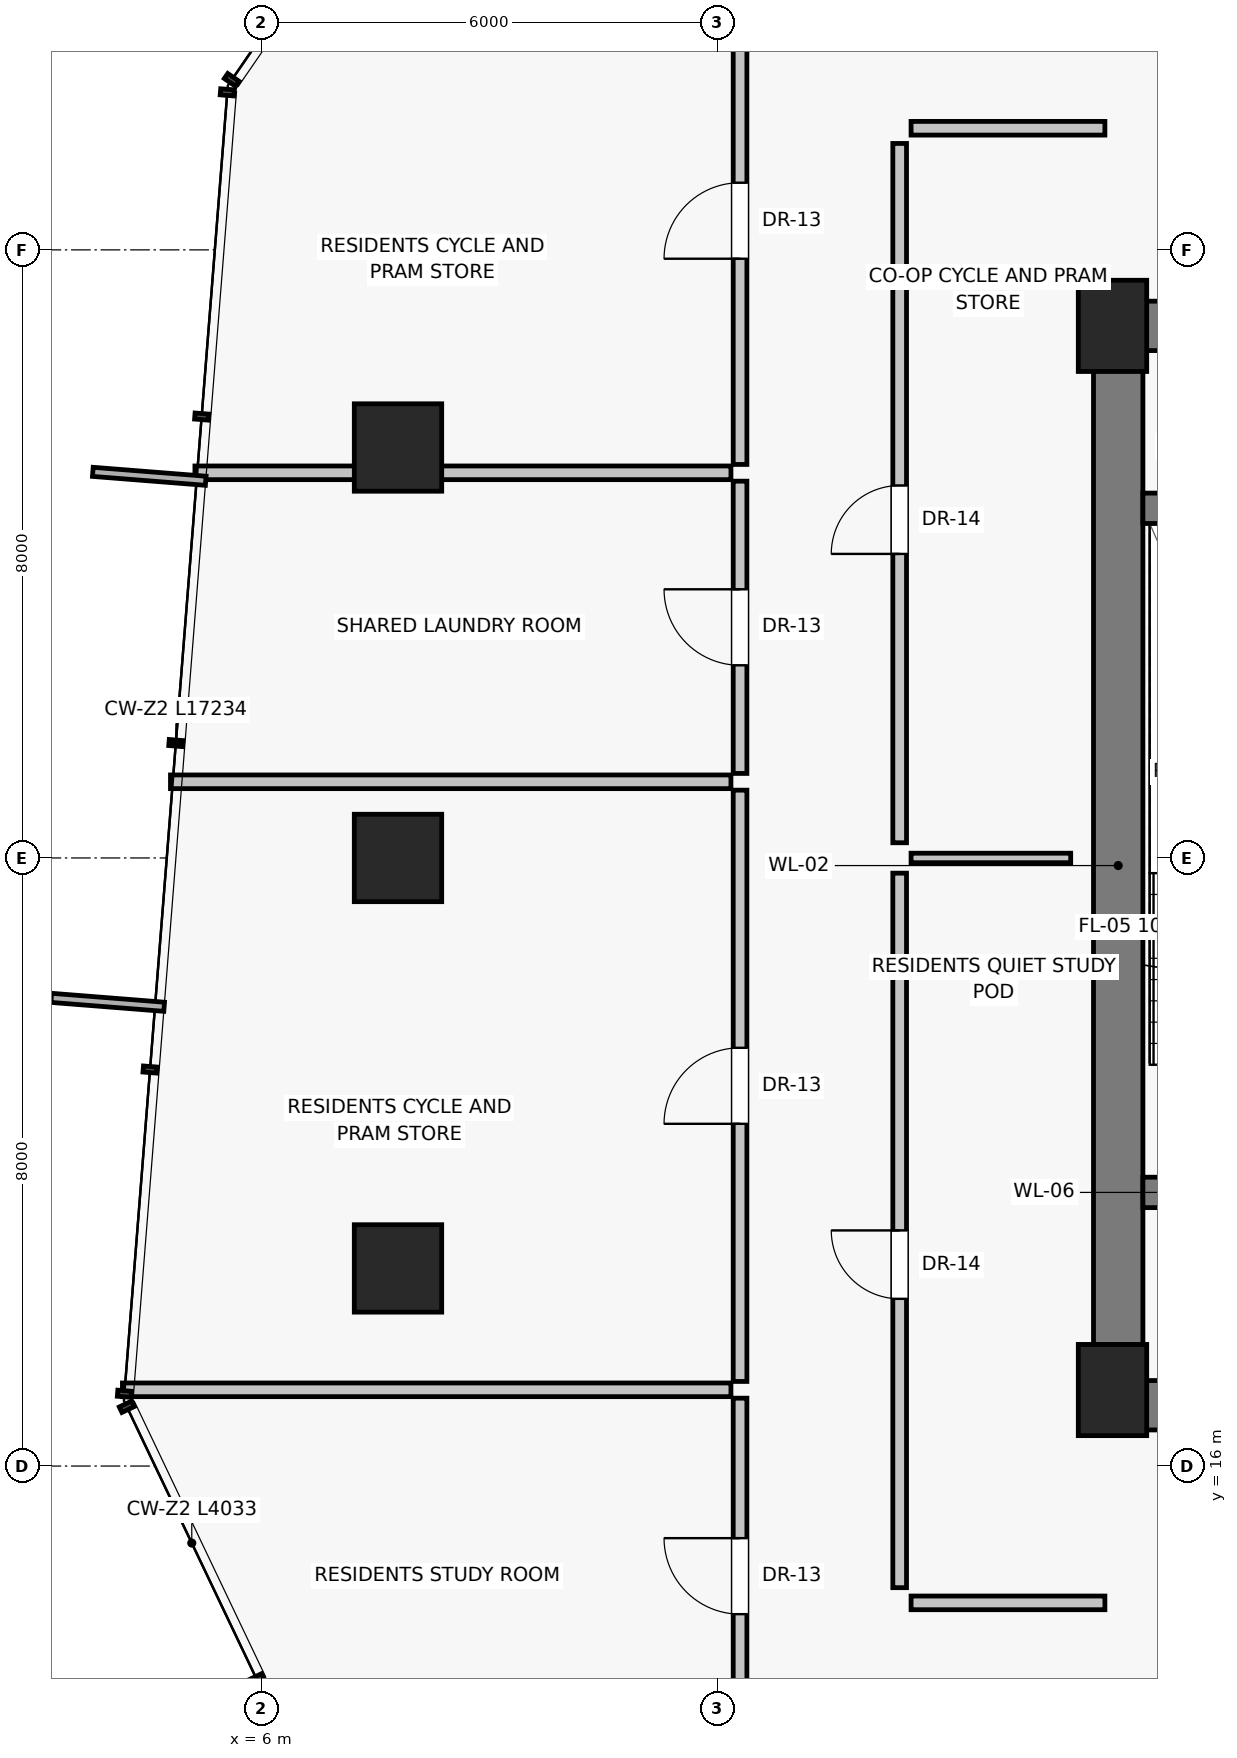
"""IFC4 building model, lengths in metres.
Left out: names, types, materials, properties, quantities, classifications, styles, units other than length and angle.
Written with IfcOpenShell. Run it as: python <this file> out.ifc"""

import sys

from ifc_helpers import new_model, si_unit, direction, frame, frame_2d, origin, origin_2d, place, context, subcontext, project, spatial, rectangle, extrude, source, transform, mapped, element, fill, save


model = new_model("IFC4")
c1 = context("Model", 3, precision=1e-05, world=origin(), true_north=direction((0.0, 1.0)))
c2 = subcontext(c1, "Body", "Model", "MODEL_VIEW")
j1 = project(units=[si_unit("LENGTHUNIT", "METRE"), si_unit("PLANEANGLEUNIT", "RADIAN")], contexts=[c1])
p1 = place(None, origin())
s1 = spatial("IfcSite", under=j1, at=p1, CompositionType="ELEMENT")
p2 = place(p1, origin())
s2 = spatial("IfcBuilding", under=s1, at=p2, CompositionType="ELEMENT")
p3 = place(p2, frame((0.0, 0.0, 113.25)))
s3 = spatial("IfcBuildingStorey", under=s2, at=p3, CompositionType="ELEMENT", Elevation=113.25)
for number, where, z_axis, x_axis in (
    (1, (17.2, 17.0, 0.0), (0.0, 0.0, 1.0), (1.0, 0.0, 0.0)),
    (2, (17.2, 31.0, 0.0), (0.0, 0.0, 1.0), (1.0, 0.0, 0.0)),
):
    element("IfcColumn", number, at=place(p3, frame(where, z_axis=z_axis, x_axis=x_axis)), inside=s3, PredefinedType="PILASTER", context=c2, shape_type="SweptSolid", body=[
        extrude(rectangle(XDim=0.9, YDim=1.2, at=origin_2d()), origin(), (0.0, 0.0, 1.0), 3.25),
    ])
for number, where, z_axis, x_axis in (
    (3, (7.8, 29.4, 0.0), (0.0, 0.0, 1.0), (1.0, 0.0, 0.0)),
    (4, (7.8, 24.0, 0.0), (0.0, 0.0, 1.0), (1.0, 0.0, 0.0)),
    (5, (7.8, 18.6, 0.0), (0.0, 0.0, 1.0), (1.0, 0.0, 0.0)),
):
    element("IfcColumn", number, at=place(p3, frame(where, z_axis=z_axis, x_axis=x_axis)), inside=s3, PredefinedType="COLUMN", context=c2, shape_type="SweptSolid", body=[
        extrude(rectangle(XDim=1.15, YDim=1.15, at=origin_2d()), origin(), (0.0, 0.0, 1.0), 3.25),
    ])
p4 = place(p3, frame((17.275, 16.8, 0.0), z_axis=(0.0, 0.0, 1.0), x_axis=(0.0, 1.0, 0.0)))
e6 = element("IfcWall", 6, at=p4, inside=s3, PredefinedType="SHEAR", context=c2, shape_type="SweptSolid", body=[
    extrude(rectangle(XDim=14.2, YDim=0.65, at=frame_2d((7.1, 0.0))), origin(), (0.0, 0.0, 1.0), 3.0),
])
p5 = place(p3, frame((17.2, 16.8, 0.0), z_axis=(0.0, 0.0, 1.0), x_axis=(1.0, 0.0, 0.0)))
e7 = element("IfcWall", 7, at=p5, inside=s3, PredefinedType="SHEAR", context=c2, shape_type="SweptSolid", body=[
    extrude(rectangle(XDim=5.85, YDim=0.65, at=frame_2d((2.925, 0.0))), origin(), (0.0, 0.0, 1.0), 3.0),
])
p6 = place(p5, frame((1.15, 0.0, 0.0)))
e8 = element("IfcOpeningElement", 8, at=p6, cuts=e7, PredefinedType="OPENING", context=c2, shape_type="SweptSolid", body=[
    extrude(rectangle(XDim=1.2, YDim=2.03, at=frame_2d((0.6, 1.015))), frame((0.0, 0.335, 0.0), z_axis=(0.0, -1.0, 0.0), x_axis=(1.0, 0.0, 0.0)), (0.0, 0.0, 1.0), 0.67),
])
p7 = place(p3, frame((17.2, 31.0, 0.0), z_axis=(0.0, 0.0, 1.0), x_axis=(1.0, 0.0, 0.0)))
e9 = element("IfcWall", 9, at=p7, inside=s3, PredefinedType="SHEAR", context=c2, shape_type="SweptSolid", body=[
    extrude(rectangle(XDim=3.8, YDim=0.65, at=frame_2d((1.9, 0.0))), origin(), (0.0, 0.0, 1.0), 3.0),
])
p8 = place(p7, frame((1.25, 0.0, 0.0)))
e10 = element("IfcOpeningElement", 10, at=p8, cuts=e9, PredefinedType="OPENING", context=c2, shape_type="SweptSolid", body=[
    extrude(rectangle(XDim=0.86, YDim=2.01, at=frame_2d((0.43, 1.005))), frame((0.0, 0.335, 0.0), z_axis=(0.0, -1.0, 0.0), x_axis=(1.0, 0.0, 0.0)), (0.0, 0.0, 1.0), 0.67),
])
p9 = place(p3, frame((17.6, 19.6, 0.0), z_axis=(0.0, 0.0, 1.0), x_axis=(1.0, 0.0, 0.0)))
e11 = element("IfcWall", 11, at=p9, inside=s3, PredefinedType="SHEAR", context=c2, shape_type="SweptSolid", body=[
    extrude(rectangle(XDim=3.4, YDim=0.4, at=frame_2d((1.7, 0.0))), origin(), (0.0, 0.0, 1.0), 3.0),
])
p10 = place(p9, frame((1.05, 0.0, 0.0)))
e12 = element("IfcOpeningElement", 12, at=p10, cuts=e11, PredefinedType="OPENING", context=c2, shape_type="SweptSolid", body=[
    extrude(rectangle(XDim=1.1, YDim=2.03, at=frame_2d((0.55, 1.015))), frame((0.0, 0.21, 0.0), z_axis=(0.0, -1.0, 0.0), x_axis=(1.0, 0.0, 0.0)), (0.0, 0.0, 1.0), 0.42),
])
p11 = place(p3, frame((17.6, 28.6, 0.0), z_axis=(0.0, 0.0, 1.0), x_axis=(1.0, 0.0, 0.0)))
e13 = element("IfcWall", 13, at=p11, inside=s3, PredefinedType="SHEAR", context=c2, shape_type="SweptSolid", body=[
    extrude(rectangle(XDim=3.4, YDim=0.4, at=frame_2d((1.7, 0.0))), origin(), (0.0, 0.0, 1.0), 3.0),
])
p12 = place(p3, frame((14.4, 14.4, 0.0), z_axis=(0.0, 0.0, 1.0), x_axis=(0.0, 1.0, 0.0)))
e14 = element("IfcWall", 14, at=p12, inside=s3, PredefinedType="PARTITIONING", context=c2, shape_type="SweptSolid", body=[
    extrude(rectangle(XDim=9.4, YDim=0.18, at=frame_2d((4.7, 0.0))), origin(), (0.0, 0.0, 1.0), 3.0),
])
p13 = place(p12, frame((3.8, 0.0, 0.0)))
e15 = element("IfcOpeningElement", 15, at=p13, cuts=e14, PredefinedType="OPENING", context=c2, shape_type="SweptSolid", body=[
    extrude(rectangle(XDim=0.9, YDim=2.01, at=frame_2d((0.45, 1.005))), frame((0.0, 0.1, 0.0), z_axis=(0.0, -1.0, 0.0), x_axis=(1.0, 0.0, 0.0)), (0.0, 0.0, 1.0), 0.2),
])
p14 = place(p3, frame((14.4, 24.2, 0.0), z_axis=(0.0, 0.0, 1.0), x_axis=(0.0, 1.0, 0.0)))
e16 = element("IfcWall", 16, at=p14, inside=s3, PredefinedType="PARTITIONING", context=c2, shape_type="SweptSolid", body=[
    extrude(rectangle(XDim=9.2, YDim=0.18, at=frame_2d((4.6, 0.0))), origin(), (0.0, 0.0, 1.0), 3.0),
])
p15 = place(p14, frame((3.8, 0.0, 0.0)))
e17 = element("IfcOpeningElement", 17, at=p15, cuts=e16, PredefinedType="OPENING", context=c2, shape_type="SweptSolid", body=[
    extrude(rectangle(XDim=0.9, YDim=2.01, at=frame_2d((0.45, 1.005))), frame((0.0, 0.1, 0.0), z_axis=(0.0, -1.0, 0.0), x_axis=(1.0, 0.0, 0.0)), (0.0, 0.0, 1.0), 0.2),
])
p16 = place(p3, frame((14.55, 24.0, 0.0), z_axis=(0.0, 0.0, 1.0), x_axis=(1.0, 0.0, 0.0)))
e18 = element("IfcWall", 18, at=p16, inside=s3, PredefinedType="PARTITIONING", context=c2, shape_type="SweptSolid", body=[
    extrude(rectangle(XDim=2.1, YDim=0.125, at=frame_2d((1.05, 0.0))), origin(), (0.0, 0.0, 1.0), 3.0),
])
for number, where, z_axis, x_axis in (
    (19, (14.55, 14.2, 0.0), (0.0, 0.0, 1.0), (1.0, 0.0, 0.0)),
    (20, (14.55, 33.6, 0.0), (0.0, 0.0, 1.0), (1.0, 0.0, 0.0)),
):
    element("IfcWall", number, at=place(p3, frame(where, z_axis=z_axis, x_axis=x_axis)), inside=s3, PredefinedType="PARTITIONING", context=c2, shape_type="SweptSolid", body=[
        extrude(rectangle(XDim=2.55, YDim=0.18, at=frame_2d((1.275, 0.0))), origin(), (0.0, 0.0, 1.0), 3.0),
    ])
p17 = place(p3, frame((12.3, 12.21, 0.0), z_axis=(0.0, 0.0, 1.0), x_axis=(0.0, 1.0, 0.0)))
e21 = element("IfcWall", 21, at=p17, inside=s3, PredefinedType="PARTITIONING", context=c2, shape_type="SweptSolid", body=[
    extrude(rectangle(XDim=4.683, YDim=0.18, at=frame_2d((2.342, 0.0))), origin(), (0.0, 0.0, 1.0), 3.0),
])
p18 = place(p17, frame((1.842, 0.0, 0.0)))
e22 = element("IfcOpeningElement", 22, at=p18, cuts=e21, PredefinedType="OPENING", context=c2, shape_type="SweptSolid", body=[
    extrude(rectangle(XDim=1.0, YDim=2.01, at=frame_2d((0.5, 1.005))), frame((0.0, 0.1, 0.0), z_axis=(0.0, -1.0, 0.0), x_axis=(1.0, 0.0, 0.0)), (0.0, 0.0, 1.0), 0.2),
])
p19 = place(p3, frame((12.3, 17.113, 0.0), z_axis=(0.0, 0.0, 1.0), x_axis=(0.0, 1.0, 0.0)))
e23 = element("IfcWall", 23, at=p19, inside=s3, PredefinedType="PARTITIONING", context=c2, shape_type="SweptSolid", body=[
    extrude(rectangle(XDim=7.779, YDim=0.18, at=frame_2d((3.89, 0.0))), origin(), (0.0, 0.0, 1.0), 2.58),
])
p20 = place(p19, frame((3.389, 0.0, 0.0)))
e24 = element("IfcOpeningElement", 24, at=p20, cuts=e23, PredefinedType="OPENING", context=c2, shape_type="SweptSolid", body=[
    extrude(rectangle(XDim=1.0, YDim=2.01, at=frame_2d((0.5, 1.005))), frame((0.0, 0.1, 0.0), z_axis=(0.0, -1.0, 0.0), x_axis=(1.0, 0.0, 0.0)), (0.0, 0.0, 1.0), 0.2),
])
p21 = place(p3, frame((12.18, 17.003, 0.0), z_axis=(0.0, 0.0, 1.0), x_axis=(-1.0, 0.0, 0.0)))
e25 = element("IfcWall", 25, at=p21, inside=s3, PredefinedType="PARTITIONING", context=c2, shape_type="SweptSolid", body=[
    extrude(rectangle(XDim=8.005, YDim=0.18, at=frame_2d((4.003, 0.0))), origin(), (0.0, 0.0, 1.0), 3.0),
])
p22 = place(p3, frame((12.18, 25.002, 0.0), z_axis=(0.0, 0.0, 1.0), x_axis=(-1.0, 0.0, 0.0)))
e26 = element("IfcWall", 26, at=p22, inside=s3, PredefinedType="PARTITIONING", context=c2, shape_type="SweptSolid", body=[
    extrude(rectangle(XDim=7.373, YDim=0.18, at=frame_2d((3.687, 0.0))), origin(), (0.0, 0.0, 1.0), 3.0),
])
p23 = place(p3, frame((12.3, 25.112, 0.0), z_axis=(0.0, 0.0, 1.0), x_axis=(0.0, 1.0, 0.0)))
e27 = element("IfcWall", 27, at=p23, inside=s3, PredefinedType="PARTITIONING", context=c2, shape_type="SweptSolid", body=[
    extrude(rectangle(XDim=3.845, YDim=0.18, at=frame_2d((1.922, 0.0))), origin(), (0.0, 0.0, 1.0), 2.58),
])
p24 = place(p23, frame((1.423, 0.0, 0.0)))
e28 = element("IfcOpeningElement", 28, at=p24, cuts=e27, PredefinedType="OPENING", context=c2, shape_type="SweptSolid", body=[
    extrude(rectangle(XDim=1.0, YDim=2.01, at=frame_2d((0.5, 1.005))), frame((0.0, 0.1, 0.0), z_axis=(0.0, -1.0, 0.0), x_axis=(1.0, 0.0, 0.0)), (0.0, 0.0, 1.0), 0.2),
])
p25 = place(p3, frame((12.3, 29.177, 0.0), z_axis=(0.0, 0.0, 1.0), x_axis=(0.0, 1.0, 0.0)))
e29 = element("IfcWall", 29, at=p25, inside=s3, PredefinedType="PARTITIONING", context=c2, shape_type="SweptSolid", body=[
    extrude(rectangle(XDim=6.413, YDim=0.18, at=frame_2d((3.207, 0.0))), origin(), (0.0, 0.0, 1.0), 2.58),
])
p26 = place(p25, frame((2.707, 0.0, 0.0)))
e30 = element("IfcOpeningElement", 30, at=p26, cuts=e29, PredefinedType="OPENING", context=c2, shape_type="SweptSolid", body=[
    extrude(rectangle(XDim=1.0, YDim=2.01, at=frame_2d((0.5, 1.005))), frame((0.0, 0.1, 0.0), z_axis=(0.0, -1.0, 0.0), x_axis=(1.0, 0.0, 0.0)), (0.0, 0.0, 1.0), 0.2),
])
p27 = place(p3, frame((12.18, 29.067, 0.0), z_axis=(0.0, 0.0, 1.0), x_axis=(-1.0, 0.0, 0.0)))
e31 = element("IfcWall", 31, at=p27, inside=s3, PredefinedType="PARTITIONING", context=c2, shape_type="SweptSolid", body=[
    extrude(rectangle(XDim=7.052, YDim=0.18, at=frame_2d((3.526, 0.0))), origin(), (0.0, 0.0, 1.0), 2.378),
])
m1 = source(origin(), c2, "Body", "SweptSolid", [
    extrude(rectangle(XDim=0.9, YDim=2.01, at=frame_2d((0.45, 1.005))), frame((0.0, 0.025, 0.0), z_axis=(0.0, -1.0, 0.0), x_axis=(1.0, 0.0, 0.0)), (0.0, 0.0, 1.0), 0.05),
])
p28 = place(p13, origin())
e32 = element("IfcDoor", 32, at=p28, inside=s3, OperationType="SINGLE_SWING_RIGHT", PredefinedType="DOOR", context=c2, shape_type="MappedRepresentation", body=[
    mapped(m1, transform((0.0, 0.0, 0.0), scale=1.0)),
])
fill(e15, e32)
p29 = place(p15, origin())
e33 = element("IfcDoor", 33, at=p29, inside=s3, OperationType="SINGLE_SWING_LEFT", PredefinedType="DOOR", context=c2, shape_type="MappedRepresentation", body=[
    mapped(m1, transform((0.0, 0.0, 0.0), scale=1.0)),
])
fill(e17, e33)
m2 = source(origin(), c2, "Body", "SweptSolid", [
    extrude(rectangle(XDim=1.0, YDim=2.01, at=frame_2d((0.5, 1.005))), frame((0.0, 0.025, 0.0), z_axis=(0.0, -1.0, 0.0), x_axis=(1.0, 0.0, 0.0)), (0.0, 0.0, 1.0), 0.05),
])
p30 = place(p18, origin())
e34 = element("IfcDoor", 34, at=p30, inside=s3, OperationType="SINGLE_SWING_RIGHT", PredefinedType="DOOR", context=c2, shape_type="MappedRepresentation", body=[
    mapped(m2, transform((0.0, 0.0, 0.0), scale=1.0)),
])
fill(e22, e34)
p31 = place(p20, origin())
e35 = element("IfcDoor", 35, at=p31, inside=s3, OperationType="SINGLE_SWING_LEFT", PredefinedType="DOOR", context=c2, shape_type="MappedRepresentation", body=[
    mapped(m2, transform((0.0, 0.0, 0.0), scale=1.0)),
])
fill(e24, e35)
p32 = place(p24, origin())
e36 = element("IfcDoor", 36, at=p32, inside=s3, OperationType="SINGLE_SWING_RIGHT", PredefinedType="DOOR", context=c2, shape_type="MappedRepresentation", body=[
    mapped(m2, transform((0.0, 0.0, 0.0), scale=1.0)),
])
fill(e28, e36)
p33 = place(p26, origin())
e37 = element("IfcDoor", 37, at=p33, inside=s3, OperationType="SINGLE_SWING_LEFT", PredefinedType="DOOR", context=c2, shape_type="MappedRepresentation", body=[
    mapped(m2, transform((0.0, 0.0, 0.0), scale=1.0)),
])
fill(e30, e37)
save(model, sys.argv[1])
